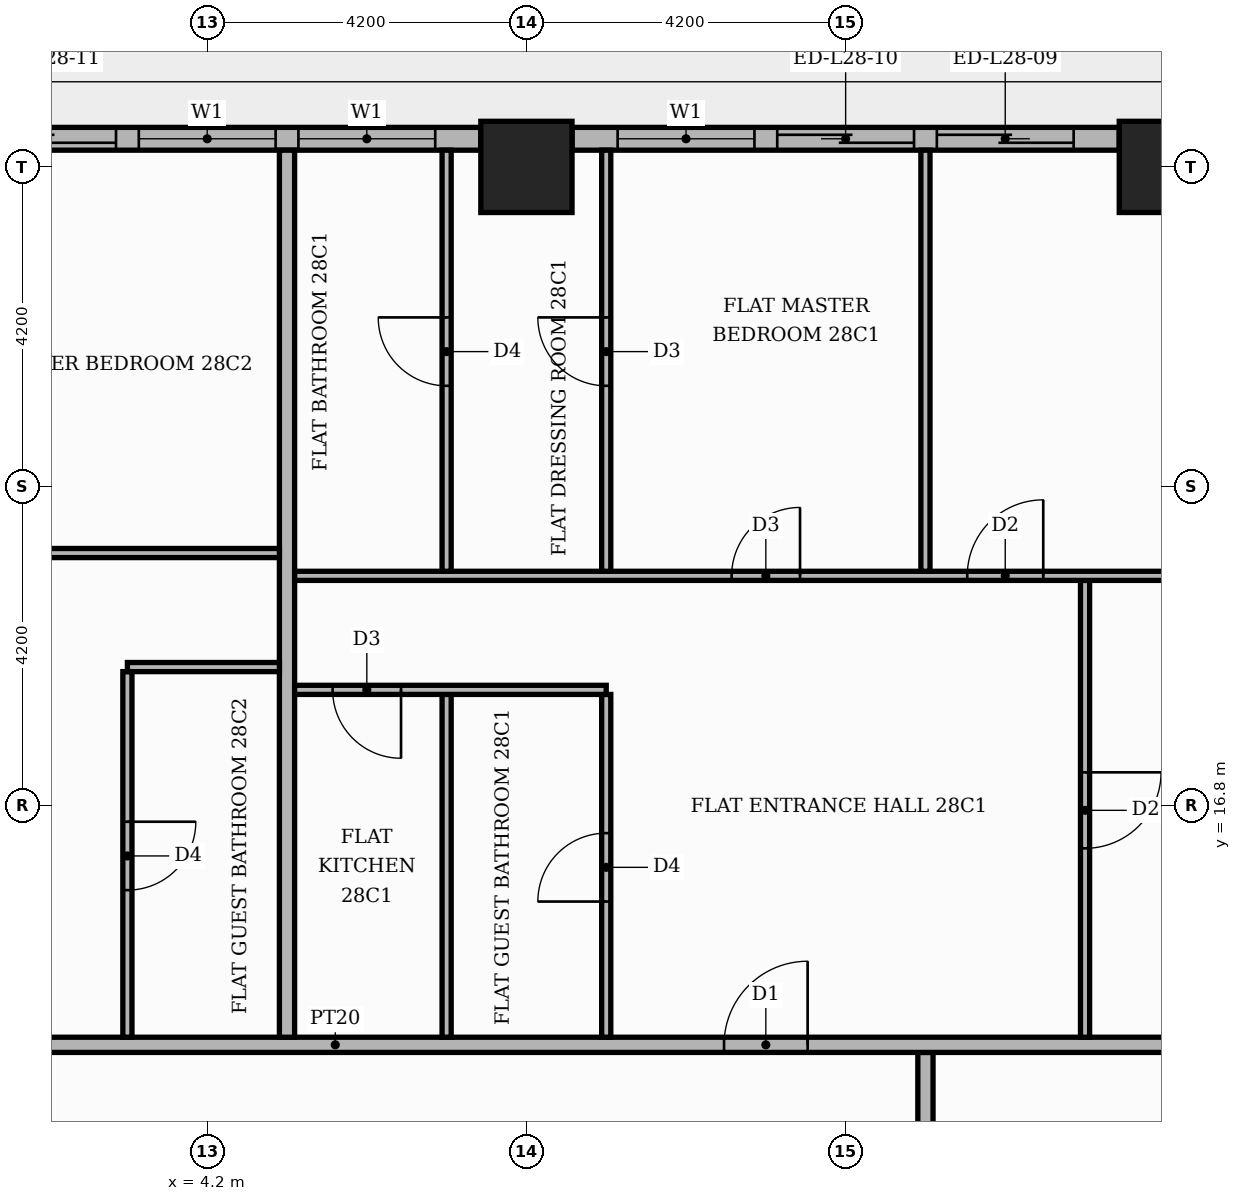
"""IFC4 building model, lengths in metres.
Left out: names, types, materials, properties, quantities, classifications, styles, units other than length and angle.
Written with IfcOpenShell. Run it as: python <this file> out.ifc"""

import sys

from ifc_helpers import new_model, si_unit, direction, frame, frame_2d, origin, origin_2d, place, context, subcontext, project, spatial, rectangle, extrude, element, fill, save


model = new_model("IFC4")
c1 = context("Model", 3, precision=1e-05, world=origin(), true_north=direction((0.0, 1.0)))
c2 = subcontext(c1, "Body", "Model", "MODEL_VIEW")
j1 = project(units=[si_unit("LENGTHUNIT", "METRE"), si_unit("PLANEANGLEUNIT", "RADIAN")], contexts=[c1])
p1 = place(None, origin())
s1 = spatial("IfcSite", under=j1, at=p1, CompositionType="ELEMENT")
p2 = place(p1, origin())
s2 = spatial("IfcBuilding", under=s1, at=p2, CompositionType="ELEMENT")
p3 = place(p2, frame((0.0, 0.0, 118.2)))
s3 = spatial("IfcBuildingStorey", under=s2, at=p3, CompositionType="ELEMENT", Elevation=118.2)
for number, where, z_axis, x_axis in (
    (1, (8.4, 25.2, 0.0), (0.0, 0.0, 1.0), (1.0, 0.0, 0.0)),
    (2, (16.8, 25.2, 0.0), (0.0, 0.0, 1.0), (1.0, 0.0, 0.0)),
):
    element("IfcColumn", number, at=place(p3, frame(where, z_axis=z_axis, x_axis=x_axis)), inside=s3, PredefinedType="COLUMN", context=c2, shape_type="SweptSolid", body=[
        extrude(rectangle(XDim=1.2, YDim=1.2, at=origin_2d()), origin(), (0.0, 0.0, 1.0), 3.9),
    ])
p4 = place(p3, frame((16.2, 25.57, 0.0), z_axis=(0.0, 0.0, 1.0), x_axis=(-1.0, 0.0, 0.0)))
e3 = element("IfcWall", 3, at=p4, inside=s3, PredefinedType="STANDARD", context=c2, shape_type="SweptSolid", body=[
    extrude(rectangle(XDim=7.2, YDim=0.3, at=frame_2d((3.6, 0.0))), origin(), (0.0, 0.0, 1.0), 3.48),
])
p5 = place(p4, frame((0.6, 0.0, 0.0)))
e4 = element("IfcOpeningElement", 4, at=p5, cuts=e3, PredefinedType="OPENING", context=c2, shape_type="SweptSolid", body=[
    extrude(rectangle(XDim=1.8, YDim=2.4, at=frame_2d((0.9, 1.2))), frame((0.0, 0.16, 0.0), z_axis=(0.0, -1.0, 0.0), x_axis=(1.0, 0.0, 0.0)), (0.0, 0.0, 1.0), 0.32),
])
p6 = place(p4, frame((2.7, 0.0, 0.0)))
e5 = element("IfcOpeningElement", 5, at=p6, cuts=e3, PredefinedType="OPENING", context=c2, shape_type="SweptSolid", body=[
    extrude(rectangle(XDim=1.8, YDim=2.4, at=frame_2d((0.9, 1.2))), frame((0.0, 0.16, 0.0), z_axis=(0.0, -1.0, 0.0), x_axis=(1.0, 0.0, 0.0)), (0.0, 0.0, 1.0), 0.32),
])
p7 = place(p4, frame((4.8, 0.0, 0.9)))
e6 = element("IfcOpeningElement", 6, at=p7, cuts=e3, PredefinedType="OPENING", context=c2, shape_type="SweptSolid", body=[
    extrude(rectangle(XDim=1.8, YDim=2.1, at=frame_2d((0.9, 1.05))), frame((0.0, 0.16, 0.0), z_axis=(0.0, -1.0, 0.0), x_axis=(1.0, 0.0, 0.0)), (0.0, 0.0, 1.0), 0.32),
])
p8 = place(p3, frame((7.8, 25.57, 0.0), z_axis=(0.0, 0.0, 1.0), x_axis=(-1.0, 0.0, 0.0)))
e7 = element("IfcWall", 7, at=p8, inside=s3, PredefinedType="STANDARD", context=c2, shape_type="SweptSolid", body=[
    extrude(rectangle(XDim=7.2, YDim=0.3, at=frame_2d((3.6, 0.0))), origin(), (0.0, 0.0, 1.0), 3.48),
])
p9 = place(p8, frame((0.6, 0.0, 0.9)))
e8 = element("IfcOpeningElement", 8, at=p9, cuts=e7, PredefinedType="OPENING", context=c2, shape_type="SweptSolid", body=[
    extrude(rectangle(XDim=1.8, YDim=2.1, at=frame_2d((0.9, 1.05))), frame((0.0, 0.16, 0.0), z_axis=(0.0, -1.0, 0.0), x_axis=(1.0, 0.0, 0.0)), (0.0, 0.0, 1.0), 0.32),
])
p10 = place(p8, frame((2.7, 0.0, 0.9)))
e9 = element("IfcOpeningElement", 9, at=p10, cuts=e7, PredefinedType="OPENING", context=c2, shape_type="SweptSolid", body=[
    extrude(rectangle(XDim=1.8, YDim=2.1, at=frame_2d((0.9, 1.05))), frame((0.0, 0.16, 0.0), z_axis=(0.0, -1.0, 0.0), x_axis=(1.0, 0.0, 0.0)), (0.0, 0.0, 1.0), 0.32),
])
p11 = place(p8, frame((4.8, 0.0, 0.0)))
e10 = element("IfcOpeningElement", 10, at=p11, cuts=e7, PredefinedType="OPENING", context=c2, shape_type="SweptSolid", body=[
    extrude(rectangle(XDim=1.8, YDim=2.4, at=frame_2d((0.9, 1.2))), frame((0.0, 0.16, 0.0), z_axis=(0.0, -1.0, 0.0), x_axis=(1.0, 0.0, 0.0)), (0.0, 0.0, 1.0), 0.32),
])
p12 = place(p3, frame((13.65, -5.15, 0.0), z_axis=(0.0, 0.0, 1.0), x_axis=(0.0, 1.0, 0.0)))
e11 = element("IfcWall", 11, at=p12, inside=s3, PredefinedType="PARTITIONING", context=c2, shape_type="SweptSolid", body=[
    extrude(rectangle(XDim=18.7, YDim=0.2, at=frame_2d((9.35, 0.0))), origin(), (0.0, 0.0, 1.0), 3.48),
])
p13 = place(p12, frame((1.45, 0.0, 0.0)))
e12 = element("IfcOpeningElement", 12, at=p13, cuts=e11, PredefinedType="OPENING", context=c2, shape_type="SweptSolid", body=[
    extrude(rectangle(XDim=1.1, YDim=2.4, at=frame_2d((0.55, 1.2))), frame((0.0, 0.11, 0.0), z_axis=(0.0, -1.0, 0.0), x_axis=(1.0, 0.0, 0.0)), (0.0, 0.0, 1.0), 0.22),
])
p14 = place(p3, frame((-13.65, 13.65, 0.0), z_axis=(0.0, 0.0, 1.0), x_axis=(1.0, 0.0, 0.0)))
e13 = element("IfcWall", 13, at=p14, inside=s3, PredefinedType="PARTITIONING", context=c2, shape_type="SweptSolid", body=[
    extrude(rectangle(XDim=39.07, YDim=0.2, at=frame_2d((19.535, 0.0))), origin(), (0.0, 0.0, 1.0), 3.48),
])
p15 = place(p14, frame((24.65, 0.0, 0.0)))
e14 = element("IfcOpeningElement", 14, at=p15, cuts=e13, PredefinedType="OPENING", context=c2, shape_type="SweptSolid", body=[
    extrude(rectangle(XDim=1.1, YDim=2.4, at=frame_2d((0.55, 1.2))), frame((0.0, 0.11, 0.0), z_axis=(0.0, -1.0, 0.0), x_axis=(1.0, 0.0, 0.0)), (0.0, 0.0, 1.0), 0.22),
])
p16 = place(p14, frame((14.15, 0.0, 0.0)))
e15 = element("IfcOpeningElement", 15, at=p16, cuts=e13, PredefinedType="OPENING", context=c2, shape_type="SweptSolid", body=[
    extrude(rectangle(XDim=1.1, YDim=2.4, at=frame_2d((0.55, 1.2))), frame((0.0, 0.11, 0.0), z_axis=(0.0, -1.0, 0.0), x_axis=(1.0, 0.0, 0.0)), (0.0, 0.0, 1.0), 0.22),
])
p17 = place(p3, frame((3.15, 13.75, 0.0), z_axis=(0.0, 0.0, 1.0), x_axis=(0.0, 1.0, 0.0)))
e16 = element("IfcWall", 16, at=p17, inside=s3, PredefinedType="PARTITIONING", context=c2, shape_type="SweptSolid", body=[
    extrude(rectangle(XDim=4.81, YDim=0.12, at=frame_2d((2.405, 0.0))), origin(), (0.0, 0.0, 1.0), 3.48),
])
p18 = place(p17, frame((1.935, 0.0, 0.0)))
e17 = element("IfcOpeningElement", 17, at=p18, cuts=e16, PredefinedType="OPENING", context=c2, shape_type="SweptSolid", body=[
    extrude(rectangle(XDim=0.9, YDim=2.1, at=frame_2d((0.45, 1.05))), frame((0.0, 0.07, 0.0), z_axis=(0.0, -1.0, 0.0), x_axis=(1.0, 0.0, 0.0)), (0.0, 0.0, 1.0), 0.14),
])
p19 = place(p3, frame((5.25, 13.75, 0.0), z_axis=(0.0, 0.0, 1.0), x_axis=(0.0, 1.0, 0.0)))
e18 = element("IfcWall", 18, at=p19, inside=s3, PredefinedType="PARTITIONING", context=c2, shape_type="SweptSolid", body=[
    extrude(rectangle(XDim=11.67, YDim=0.2, at=frame_2d((5.835, 0.0))), origin(), (0.0, 0.0, 1.0), 3.48),
])
p20 = place(p3, frame((7.35, 13.75, 0.0), z_axis=(0.0, 0.0, 1.0), x_axis=(0.0, 1.0, 0.0)))
e19 = element("IfcWall", 19, at=p20, inside=s3, PredefinedType="PARTITIONING", context=c2, shape_type="SweptSolid", body=[
    extrude(rectangle(XDim=4.51, YDim=0.12, at=frame_2d((2.255, 0.0))), origin(), (0.0, 0.0, 1.0), 3.48),
])
p21 = place(p3, frame((9.45, 13.75, 0.0), z_axis=(0.0, 0.0, 1.0), x_axis=(0.0, 1.0, 0.0)))
e20 = element("IfcWall", 20, at=p21, inside=s3, PredefinedType="PARTITIONING", context=c2, shape_type="SweptSolid", body=[
    extrude(rectangle(XDim=4.51, YDim=0.12, at=frame_2d((2.255, 0.0))), origin(), (0.0, 0.0, 1.0), 3.48),
])
p22 = place(p21, frame((1.785, 0.0, 0.0)))
e21 = element("IfcOpeningElement", 21, at=p22, cuts=e20, PredefinedType="OPENING", context=c2, shape_type="SweptSolid", body=[
    extrude(rectangle(XDim=0.9, YDim=2.1, at=frame_2d((0.45, 1.05))), frame((0.0, 0.07, 0.0), z_axis=(0.0, -1.0, 0.0), x_axis=(1.0, 0.0, 0.0)), (0.0, 0.0, 1.0), 0.14),
])
p23 = place(p3, frame((15.75, 13.75, 0.0), z_axis=(0.0, 0.0, 1.0), x_axis=(0.0, 1.0, 0.0)))
e22 = element("IfcWall", 22, at=p23, inside=s3, PredefinedType="PARTITIONING", context=c2, shape_type="SweptSolid", body=[
    extrude(rectangle(XDim=6.01, YDim=0.12, at=frame_2d((3.005, 0.0))), origin(), (0.0, 0.0, 1.0), 3.48),
])
p24 = place(p23, frame((2.485, 0.0, 0.0)))
e23 = element("IfcOpeningElement", 23, at=p24, cuts=e22, PredefinedType="OPENING", context=c2, shape_type="SweptSolid", body=[
    extrude(rectangle(XDim=1.0, YDim=2.1, at=frame_2d((0.5, 1.05))), frame((0.0, 0.07, 0.0), z_axis=(0.0, -1.0, 0.0), x_axis=(1.0, 0.0, 0.0)), (0.0, 0.0, 1.0), 0.14),
])
p25 = place(p3, frame((5.35, 18.32, 0.0), z_axis=(0.0, 0.0, 1.0), x_axis=(1.0, 0.0, 0.0)))
e24 = element("IfcWall", 24, at=p25, inside=s3, PredefinedType="PARTITIONING", context=c2, shape_type="SweptSolid", body=[
    extrude(rectangle(XDim=4.1, YDim=0.12, at=frame_2d((2.05, 0.0))), origin(), (0.0, 0.0, 1.0), 3.48),
])
p26 = place(p25, frame((0.5, 0.0, 0.0)))
e25 = element("IfcOpeningElement", 25, at=p26, cuts=e24, PredefinedType="OPENING", context=c2, shape_type="SweptSolid", body=[
    extrude(rectangle(XDim=0.9, YDim=2.1, at=frame_2d((0.45, 1.05))), frame((0.0, 0.07, 0.0), z_axis=(0.0, -1.0, 0.0), x_axis=(1.0, 0.0, 0.0)), (0.0, 0.0, 1.0), 0.14),
])
p27 = place(p3, frame((3.15, 18.62, 0.0), z_axis=(0.0, 0.0, 1.0), x_axis=(1.0, 0.0, 0.0)))
e26 = element("IfcWall", 26, at=p27, inside=s3, PredefinedType="PARTITIONING", context=c2, shape_type="SweptSolid", body=[
    extrude(rectangle(XDim=2.0, YDim=0.12, at=frame_2d((1.0, 0.0))), origin(), (0.0, 0.0, 1.0), 3.48),
])
p28 = place(p3, frame((5.35, 19.82, 0.0), z_axis=(0.0, 0.0, 1.0), x_axis=(1.0, 0.0, 0.0)))
e27 = element("IfcWall", 27, at=p28, inside=s3, PredefinedType="PARTITIONING", context=c2, shape_type="SweptSolid", body=[
    extrude(rectangle(XDim=12.05, YDim=0.12, at=frame_2d((6.025, 0.0))), origin(), (0.0, 0.0, 1.0), 3.48),
])
p29 = place(p28, frame((8.85, 0.0, 0.0)))
e28 = element("IfcOpeningElement", 28, at=p29, cuts=e27, PredefinedType="OPENING", context=c2, shape_type="SweptSolid", body=[
    extrude(rectangle(XDim=1.0, YDim=2.1, at=frame_2d((0.5, 1.05))), frame((0.0, 0.07, 0.0), z_axis=(0.0, -1.0, 0.0), x_axis=(1.0, 0.0, 0.0)), (0.0, 0.0, 1.0), 0.14),
])
p30 = place(p28, frame((5.75, 0.0, 0.0)))
e29 = element("IfcOpeningElement", 29, at=p30, cuts=e27, PredefinedType="OPENING", context=c2, shape_type="SweptSolid", body=[
    extrude(rectangle(XDim=0.9, YDim=2.1, at=frame_2d((0.45, 1.05))), frame((0.0, 0.07, 0.0), z_axis=(0.0, -1.0, 0.0), x_axis=(1.0, 0.0, 0.0)), (0.0, 0.0, 1.0), 0.14),
])
p31 = place(p3, frame((7.35, 19.88, 0.0), z_axis=(0.0, 0.0, 1.0), x_axis=(0.0, 1.0, 0.0)))
e30 = element("IfcWall", 30, at=p31, inside=s3, PredefinedType="PARTITIONING", context=c2, shape_type="SweptSolid", body=[
    extrude(rectangle(XDim=5.54, YDim=0.12, at=frame_2d((2.77, 0.0))), origin(), (0.0, 0.0, 1.0), 3.48),
])
p32 = place(p31, frame((2.44, 0.0, 0.0)))
e31 = element("IfcOpeningElement", 31, at=p32, cuts=e30, PredefinedType="OPENING", context=c2, shape_type="SweptSolid", body=[
    extrude(rectangle(XDim=0.9, YDim=2.1, at=frame_2d((0.45, 1.05))), frame((0.0, 0.07, 0.0), z_axis=(0.0, -1.0, 0.0), x_axis=(1.0, 0.0, 0.0)), (0.0, 0.0, 1.0), 0.14),
])
p33 = place(p3, frame((9.45, 19.88, 0.0), z_axis=(0.0, 0.0, 1.0), x_axis=(0.0, 1.0, 0.0)))
e32 = element("IfcWall", 32, at=p33, inside=s3, PredefinedType="PARTITIONING", context=c2, shape_type="SweptSolid", body=[
    extrude(rectangle(XDim=5.54, YDim=0.12, at=frame_2d((2.77, 0.0))), origin(), (0.0, 0.0, 1.0), 3.48),
])
p34 = place(p33, frame((2.44, 0.0, 0.0)))
e33 = element("IfcOpeningElement", 33, at=p34, cuts=e32, PredefinedType="OPENING", context=c2, shape_type="SweptSolid", body=[
    extrude(rectangle(XDim=0.9, YDim=2.1, at=frame_2d((0.45, 1.05))), frame((0.0, 0.07, 0.0), z_axis=(0.0, -1.0, 0.0), x_axis=(1.0, 0.0, 0.0)), (0.0, 0.0, 1.0), 0.14),
])
p35 = place(p3, frame((13.65, 19.88, 0.0), z_axis=(0.0, 0.0, 1.0), x_axis=(0.0, 1.0, 0.0)))
e34 = element("IfcWall", 34, at=p35, inside=s3, PredefinedType="PARTITIONING", context=c2, shape_type="SweptSolid", body=[
    extrude(rectangle(XDim=5.54, YDim=0.12, at=frame_2d((2.77, 0.0))), origin(), (0.0, 0.0, 1.0), 3.48),
])
p36 = place(p3, frame((-13.55, 20.12, 0.0), z_axis=(0.0, 0.0, 1.0), x_axis=(1.0, 0.0, 0.0)))
e35 = element("IfcWall", 35, at=p36, inside=s3, PredefinedType="PARTITIONING", context=c2, shape_type="SweptSolid", body=[
    extrude(rectangle(XDim=18.7, YDim=0.12, at=frame_2d((9.35, 0.0))), origin(), (0.0, 0.0, 1.0), 3.48),
])
p37 = place(p36, frame((14.15, 0.0, 0.0)))
e36 = element("IfcOpeningElement", 36, at=p37, cuts=e35, PredefinedType="OPENING", context=c2, shape_type="SweptSolid", body=[
    extrude(rectangle(XDim=0.9, YDim=2.1, at=frame_2d((0.45, 1.05))), frame((0.0, 0.07, 0.0), z_axis=(0.0, -1.0, 0.0), x_axis=(1.0, 0.0, 0.0)), (0.0, 0.0, 1.0), 0.14),
])
p38 = place(p36, frame((2.55, 0.0, 0.0)))
e37 = element("IfcOpeningElement", 37, at=p38, cuts=e35, PredefinedType="OPENING", context=c2, shape_type="SweptSolid", body=[
    extrude(rectangle(XDim=1.0, YDim=2.1, at=frame_2d((0.5, 1.05))), frame((0.0, 0.07, 0.0), z_axis=(0.0, -1.0, 0.0), x_axis=(1.0, 0.0, 0.0)), (0.0, 0.0, 1.0), 0.14),
])
p39 = place(p5, origin())
e38 = element("IfcDoor", 38, at=p39, inside=s3, OperationType="SLIDING_TO_LEFT", PredefinedType="DOOR", context=c2, shape_type="SweptSolid", body=[
    extrude(rectangle(XDim=1.8, YDim=2.4, at=frame_2d((0.9, 1.2))), frame((0.0, 0.025, 0.0), z_axis=(0.0, -1.0, 0.0), x_axis=(1.0, 0.0, 0.0)), (0.0, 0.0, 1.0), 0.05),
])
fill(e4, e38)
p40 = place(p6, origin())
e39 = element("IfcDoor", 39, at=p40, inside=s3, OperationType="SLIDING_TO_RIGHT", PredefinedType="DOOR", context=c2, shape_type="SweptSolid", body=[
    extrude(rectangle(XDim=1.8, YDim=2.4, at=frame_2d((0.9, 1.2))), frame((0.0, 0.025, 0.0), z_axis=(0.0, -1.0, 0.0), x_axis=(1.0, 0.0, 0.0)), (0.0, 0.0, 1.0), 0.05),
])
fill(e5, e39)
p41 = place(p7, origin())
e40 = element("IfcWindow", 40, at=p41, inside=s3, PartitioningType="SINGLE_PANEL", PredefinedType="WINDOW", context=c2, shape_type="SweptSolid", body=[
    extrude(rectangle(XDim=1.8, YDim=2.1, at=frame_2d((0.9, 1.05))), frame((0.0, 0.03, 0.0), z_axis=(0.0, -1.0, 0.0), x_axis=(1.0, 0.0, 0.0)), (0.0, 0.0, 1.0), 0.06),
])
fill(e6, e40)
p42 = place(p9, origin())
e41 = element("IfcWindow", 41, at=p42, inside=s3, PartitioningType="SINGLE_PANEL", PredefinedType="WINDOW", context=c2, shape_type="SweptSolid", body=[
    extrude(rectangle(XDim=1.8, YDim=2.1, at=frame_2d((0.9, 1.05))), frame((0.0, 0.03, 0.0), z_axis=(0.0, -1.0, 0.0), x_axis=(1.0, 0.0, 0.0)), (0.0, 0.0, 1.0), 0.06),
])
fill(e8, e41)
p43 = place(p10, origin())
e42 = element("IfcWindow", 42, at=p43, inside=s3, PartitioningType="SINGLE_PANEL", PredefinedType="WINDOW", context=c2, shape_type="SweptSolid", body=[
    extrude(rectangle(XDim=1.8, YDim=2.1, at=frame_2d((0.9, 1.05))), frame((0.0, 0.03, 0.0), z_axis=(0.0, -1.0, 0.0), x_axis=(1.0, 0.0, 0.0)), (0.0, 0.0, 1.0), 0.06),
])
fill(e9, e42)
p44 = place(p11, origin())
e43 = element("IfcDoor", 43, at=p44, inside=s3, OperationType="SLIDING_TO_RIGHT", PredefinedType="DOOR", context=c2, shape_type="SweptSolid", body=[
    extrude(rectangle(XDim=1.8, YDim=2.4, at=frame_2d((0.9, 1.2))), frame((0.0, 0.025, 0.0), z_axis=(0.0, -1.0, 0.0), x_axis=(1.0, 0.0, 0.0)), (0.0, 0.0, 1.0), 0.05),
])
fill(e10, e43)
p45 = place(p15, origin())
e44 = element("IfcDoor", 44, at=p45, inside=s3, OperationType="SINGLE_SWING_RIGHT", PredefinedType="DOOR", context=c2, shape_type="SweptSolid", body=[
    extrude(rectangle(XDim=1.1, YDim=2.4, at=frame_2d((0.55, 1.2))), frame((0.0, 0.025, 0.0), z_axis=(0.0, -1.0, 0.0), x_axis=(1.0, 0.0, 0.0)), (0.0, 0.0, 1.0), 0.05),
])
fill(e14, e44)
p46 = place(p24, frame((1.0, 0.0, 0.0), z_axis=(0.0, 0.0, 1.0), x_axis=(-1.0, 0.0, 0.0)))
e45 = element("IfcDoor", 45, at=p46, inside=s3, OperationType="SINGLE_SWING_RIGHT", PredefinedType="DOOR", context=c2, shape_type="SweptSolid", body=[
    extrude(rectangle(XDim=1.0, YDim=2.1, at=frame_2d((0.5, 1.05))), frame((0.0, 0.025, 0.0), z_axis=(0.0, -1.0, 0.0), x_axis=(1.0, 0.0, 0.0)), (0.0, 0.0, 1.0), 0.05),
])
fill(e23, e45)
p47 = place(p22, origin())
e46 = element("IfcDoor", 46, at=p47, inside=s3, OperationType="SINGLE_SWING_LEFT", PredefinedType="DOOR", context=c2, shape_type="SweptSolid", body=[
    extrude(rectangle(XDim=0.9, YDim=2.1, at=frame_2d((0.45, 1.05))), frame((0.0, 0.025, 0.0), z_axis=(0.0, -1.0, 0.0), x_axis=(1.0, 0.0, 0.0)), (0.0, 0.0, 1.0), 0.05),
])
fill(e21, e46)
p48 = place(p26, frame((0.9, 0.0, 0.0), z_axis=(0.0, 0.0, 1.0), x_axis=(-1.0, 0.0, 0.0)))
e47 = element("IfcDoor", 47, at=p48, inside=s3, OperationType="SINGLE_SWING_RIGHT", PredefinedType="DOOR", context=c2, shape_type="SweptSolid", body=[
    extrude(rectangle(XDim=0.9, YDim=2.1, at=frame_2d((0.45, 1.05))), frame((0.0, 0.025, 0.0), z_axis=(0.0, -1.0, 0.0), x_axis=(1.0, 0.0, 0.0)), (0.0, 0.0, 1.0), 0.05),
])
fill(e25, e47)
p49 = place(p29, origin())
e48 = element("IfcDoor", 48, at=p49, inside=s3, OperationType="SINGLE_SWING_RIGHT", PredefinedType="DOOR", context=c2, shape_type="SweptSolid", body=[
    extrude(rectangle(XDim=1.0, YDim=2.1, at=frame_2d((0.5, 1.05))), frame((0.0, 0.025, 0.0), z_axis=(0.0, -1.0, 0.0), x_axis=(1.0, 0.0, 0.0)), (0.0, 0.0, 1.0), 0.05),
])
fill(e28, e48)
p50 = place(p30, origin())
e49 = element("IfcDoor", 49, at=p50, inside=s3, OperationType="SINGLE_SWING_RIGHT", PredefinedType="DOOR", context=c2, shape_type="SweptSolid", body=[
    extrude(rectangle(XDim=0.9, YDim=2.1, at=frame_2d((0.45, 1.05))), frame((0.0, 0.025, 0.0), z_axis=(0.0, -1.0, 0.0), x_axis=(1.0, 0.0, 0.0)), (0.0, 0.0, 1.0), 0.05),
])
fill(e29, e49)
p51 = place(p34, origin())
e50 = element("IfcDoor", 50, at=p51, inside=s3, OperationType="SINGLE_SWING_RIGHT", PredefinedType="DOOR", context=c2, shape_type="SweptSolid", body=[
    extrude(rectangle(XDim=0.9, YDim=2.1, at=frame_2d((0.45, 1.05))), frame((0.0, 0.025, 0.0), z_axis=(0.0, -1.0, 0.0), x_axis=(1.0, 0.0, 0.0)), (0.0, 0.0, 1.0), 0.05),
])
fill(e33, e50)
p52 = place(p32, origin())
e51 = element("IfcDoor", 51, at=p52, inside=s3, OperationType="SINGLE_SWING_RIGHT", PredefinedType="DOOR", context=c2, shape_type="SweptSolid", body=[
    extrude(rectangle(XDim=0.9, YDim=2.1, at=frame_2d((0.45, 1.05))), frame((0.0, 0.025, 0.0), z_axis=(0.0, -1.0, 0.0), x_axis=(1.0, 0.0, 0.0)), (0.0, 0.0, 1.0), 0.05),
])
fill(e31, e51)
p53 = place(p18, frame((0.9, 0.0, 0.0), z_axis=(0.0, 0.0, 1.0), x_axis=(-1.0, 0.0, 0.0)))
e52 = element("IfcDoor", 52, at=p53, inside=s3, OperationType="SINGLE_SWING_RIGHT", PredefinedType="DOOR", context=c2, shape_type="SweptSolid", body=[
    extrude(rectangle(XDim=0.9, YDim=2.1, at=frame_2d((0.45, 1.05))), frame((0.0, 0.025, 0.0), z_axis=(0.0, -1.0, 0.0), x_axis=(1.0, 0.0, 0.0)), (0.0, 0.0, 1.0), 0.05),
])
fill(e17, e52)
save(model, sys.argv[1])
